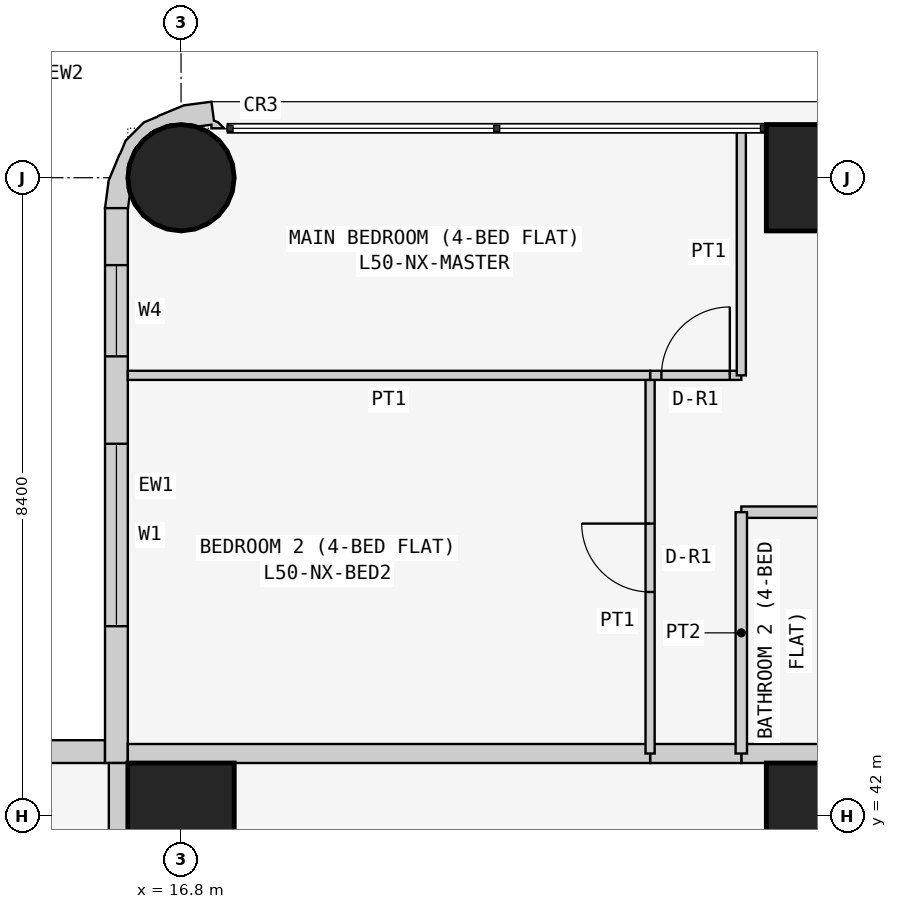
"""IFC4 building model, lengths in metres.
Left out: names, types, materials, properties, quantities, classifications, styles, units other than length and angle.
Written with IfcOpenShell. Run it as: python <this file> out.ifc"""

import sys

from ifc_helpers import new_model, si_unit, direction, frame, frame_2d, origin, origin_2d, place, context, subcontext, project, spatial, polyline, rectangle, circle, outline, extrude, element, fill, save


model = new_model("IFC4")
c1 = context("Model", 3, precision=1e-05, world=origin(), true_north=direction((0.0, 1.0)))
c2 = subcontext(c1, "Body", "Model", "MODEL_VIEW")
j1 = project(units=[si_unit("LENGTHUNIT", "METRE"), si_unit("PLANEANGLEUNIT", "RADIAN")], contexts=[c1])
p1 = place(None, origin())
s1 = spatial("IfcSite", under=j1, at=p1, CompositionType="ELEMENT")
p2 = place(p1, origin())
s2 = spatial("IfcBuilding", under=s1, at=p2, CompositionType="ELEMENT")
p3 = place(p2, frame((0.0, 0.0, 194.1)))
s3 = spatial("IfcBuildingStorey", under=s2, at=p3, CompositionType="ELEMENT", Elevation=194.1)
p4 = place(p3, frame((16.8, 42.0, 0.0), z_axis=(0.0, 0.0, 1.0), x_axis=(1.0, 0.0, 0.0)))
e1 = element("IfcColumn", 1, at=p4, inside=s3, PredefinedType="COLUMN", context=c2, shape_type="SweptSolid", body=[
    extrude(rectangle(XDim=1.4, YDim=1.4, at=origin_2d()), origin(), (0.0, 0.0, 1.0), 3.6),
])
p5 = place(p3, frame((16.8, 50.4, 0.0), z_axis=(0.0, 0.0, 1.0), x_axis=(1.0, 0.0, 0.0)))
e2 = element("IfcColumn", 2, at=p5, inside=s3, PredefinedType="COLUMN", context=c2, shape_type="SweptSolid", body=[
    extrude(circle(Radius=0.7, at=origin_2d()), origin(), (0.0, 0.0, 1.0), 3.6),
])
for number, where, z_axis, x_axis in (
    (3, (25.2, 42.0, 0.0), (0.0, 0.0, 1.0), (1.0, 0.0, 0.0)),
    (4, (25.2, 50.4, 0.0), (0.0, 0.0, 1.0), (1.0, 0.0, 0.0)),
):
    element("IfcColumn", number, at=place(p3, frame(where, z_axis=z_axis, x_axis=x_axis)), inside=s3, PredefinedType="COLUMN", context=c2, shape_type="SweptSolid", body=[
        extrude(rectangle(XDim=1.4, YDim=1.4, at=origin_2d()), origin(), (0.0, 0.0, 1.0), 3.6),
    ])
p6 = place(p3, frame((15.8, 42.85, 0.0), z_axis=(0.0, 0.0, 1.0), x_axis=(-1.0, 0.0, 0.0)))
e5 = element("IfcWall", 5, at=p6, inside=s3, PredefinedType="SOLIDWALL", context=c2, shape_type="SweptSolid", body=[
    extrude(rectangle(XDim=15.4, YDim=0.3, at=frame_2d((7.7, 0.0))), origin(), (0.0, 0.0, 1.0), 3.45),
])
p7 = place(p6, frame((1.2, 0.0, 0.9)))
e6 = element("IfcOpeningElement", 6, at=p7, cuts=e5, PredefinedType="OPENING", context=c2, shape_type="SweptSolid", body=[
    extrude(rectangle(XDim=1.8, YDim=1.5, at=frame_2d((0.9, 0.75))), frame((0.0, 0.16, 0.0), z_axis=(0.0, -1.0, 0.0), x_axis=(1.0, 0.0, 0.0)), (0.0, 0.0, 1.0), 0.32),
])
p8 = place(p6, frame((4.95, 0.0, 1.5)))
e7 = element("IfcOpeningElement", 7, at=p8, cuts=e5, PredefinedType="OPENING", context=c2, shape_type="SweptSolid", body=[
    extrude(rectangle(XDim=0.9, YDim=0.7, at=frame_2d((0.45, 0.35))), frame((0.0, 0.16, 0.0), z_axis=(0.0, -1.0, 0.0), x_axis=(1.0, 0.0, 0.0)), (0.0, 0.0, 1.0), 0.32),
])
p9 = place(p6, frame((8.5, 0.0, 0.9)))
e8 = element("IfcOpeningElement", 8, at=p9, cuts=e5, PredefinedType="OPENING", context=c2, shape_type="SweptSolid", body=[
    extrude(rectangle(XDim=1.8, YDim=1.5, at=frame_2d((0.9, 0.75))), frame((0.0, 0.16, 0.0), z_axis=(0.0, -1.0, 0.0), x_axis=(1.0, 0.0, 0.0)), (0.0, 0.0, 1.0), 0.32),
])
p10 = place(p6, frame((12.5, 0.0, 0.0)))
e9 = element("IfcOpeningElement", 9, at=p10, cuts=e5, PredefinedType="OPENING", context=c2, shape_type="SweptSolid", body=[
    extrude(rectangle(XDim=0.9, YDim=2.4, at=frame_2d((0.45, 1.2))), frame((0.0, 0.16, 0.0), z_axis=(0.0, -1.0, 0.0), x_axis=(1.0, 0.0, 0.0)), (0.0, 0.0, 1.0), 0.32),
])
p11 = place(p6, frame((13.5, 0.0, 0.9)))
e10 = element("IfcOpeningElement", 10, at=p11, cuts=e5, PredefinedType="OPENING", context=c2, shape_type="SweptSolid", body=[
    extrude(rectangle(XDim=1.2, YDim=1.5, at=frame_2d((0.6, 0.75))), frame((0.0, 0.16, 0.0), z_axis=(0.0, -1.0, 0.0), x_axis=(1.0, 0.0, 0.0)), (0.0, 0.0, 1.0), 0.32),
])
p12 = place(p3, frame((15.95, 50.0, 0.0), z_axis=(0.0, 0.0, 1.0), x_axis=(0.0, -1.0, 0.0)))
e11 = element("IfcWall", 11, at=p12, inside=s3, PredefinedType="SOLIDWALL", context=c2, shape_type="SweptSolid", body=[
    extrude(rectangle(XDim=7.3, YDim=0.3, at=frame_2d((3.65, 0.0))), origin(), (0.0, 0.0, 1.0), 3.45),
])
p13 = place(p12, frame((3.1, 0.0, 0.9)))
e12 = element("IfcOpeningElement", 12, at=p13, cuts=e11, PredefinedType="OPENING", context=c2, shape_type="SweptSolid", body=[
    extrude(rectangle(XDim=2.4, YDim=1.5, at=frame_2d((1.2, 0.75))), frame((0.0, 0.16, 0.0), z_axis=(0.0, -1.0, 0.0), x_axis=(1.0, 0.0, 0.0)), (0.0, 0.0, 1.0), 0.32),
])
p14 = place(p12, frame((0.75, 0.0, 0.9)))
e13 = element("IfcOpeningElement", 13, at=p14, cuts=e11, PredefinedType="OPENING", context=c2, shape_type="SweptSolid", body=[
    extrude(rectangle(XDim=1.2, YDim=1.5, at=frame_2d((0.6, 0.75))), frame((0.0, 0.16, 0.0), z_axis=(0.0, -1.0, 0.0), x_axis=(1.0, 0.0, 0.0)), (0.0, 0.0, 1.0), 0.32),
])
p15 = place(p3, frame((17.312, 50.988, 0.0), z_axis=(0.0, 0.0, 1.0), x_axis=(-0.439933741929, 0.898030234854, 0.0)))
e14 = element("IfcWall", 14, at=p15, inside=s3, PredefinedType="SOLIDWALL", context=c2, shape_type="SweptSolid", body=[
    extrude(outline(polyline([(0.138, -0.039), (0.182, -0.0), (0.419, -0.08), (0.536, 0.266), (0.559, 0.631), (0.555, 0.651), (0.566, 0.836), (0.456, 1.159), (0.333, 1.298), (0.324, 1.316), (0.082, 1.591), (-0.222, 1.793), (-0.39, 1.541), (-0.372, 1.532), (-0.195, 1.414), (-0.12, 1.41), (0.131, 1.287), (0.315, 1.078), (0.406, 0.814), (0.388, 0.536), (0.265, 0.285), (0.209, 0.236), (0.148, 0.053), (0.105, 0.074), (0.032, -0.076), (0.138, -0.039)])), origin(), (0.0, 0.0, 1.0), 3.45),
])
p16 = place(p3, frame((24.171, 42.825, 0.0), z_axis=(0.0, 0.0, 1.0), x_axis=(1.0, 0.0, 0.0)))
e15 = element("IfcWall", 15, at=p16, inside=s3, PredefinedType="PARTITIONING", context=c2, shape_type="SweptSolid", body=[
    extrude(rectangle(XDim=2.629, YDim=0.25, at=frame_2d((1.314, 0.0))), origin(), (0.0, 0.0, 1.0), 3.45),
])
p17 = place(p3, frame((22.971, 42.825, 0.0), z_axis=(0.0, 0.0, 1.0), x_axis=(1.0, 0.0, 0.0)))
e16 = element("IfcWall", 16, at=p17, inside=s3, PredefinedType="PARTITIONING", context=c2, shape_type="SweptSolid", body=[
    extrude(rectangle(XDim=1.2, YDim=0.25, at=frame_2d((0.6, 0.0))), origin(), (0.0, 0.0, 1.0), 3.45),
])
for number, where, z_axis, x_axis in (
    (17, (16.1, 42.825, 0.0), (0.0, 0.0, 1.0), (1.0, 0.0, 0.0)),
    (18, (15.975, 35.829, 0.0), (0.0, 0.0, 1.0), (0.0, 1.0, 0.0)),
):
    element("IfcWall", number, at=place(p3, frame(where, z_axis=z_axis, x_axis=x_axis)), inside=s3, PredefinedType="PARTITIONING", context=c2, shape_type="SweptSolid", body=[
        extrude(rectangle(XDim=6.871, YDim=0.25, at=frame_2d((3.436, 0.0))), origin(), (0.0, 0.0, 1.0), 3.45),
    ])
p18 = place(p3, frame((26.8, 46.0, 0.0), z_axis=(0.0, 0.0, 1.0), x_axis=(-1.0, 0.0, 0.0)))
e19 = element("IfcWall", 19, at=p18, inside=s3, PredefinedType="PARTITIONING", context=c2, shape_type="SweptSolid", body=[
    extrude(rectangle(XDim=2.629, YDim=0.15, at=frame_2d((1.314, 0.0))), origin(), (0.0, 0.0, 1.0), 3.45),
])
p19 = place(p3, frame((24.171, 46.0, 0.0), z_axis=(0.0, 0.0, 1.0), x_axis=(0.0, -1.0, 0.0)))
e20 = element("IfcWall", 20, at=p19, inside=s3, PredefinedType="PARTITIONING", context=c2, shape_type="SweptSolid", body=[
    extrude(rectangle(XDim=3.175, YDim=0.15, at=frame_2d((1.587, 0.0))), origin(), (0.0, 0.0, 1.0), 3.45),
])
p20 = place(p3, frame((22.971, 42.825, 0.0), z_axis=(0.0, 0.0, 1.0), x_axis=(0.0, 1.0, 0.0)))
e21 = element("IfcWall", 21, at=p20, inside=s3, PredefinedType="PARTITIONING", context=c2, shape_type="SweptSolid", body=[
    extrude(rectangle(XDim=4.975, YDim=0.12, at=frame_2d((2.488, 0.0))), origin(), (0.0, 0.0, 1.0), 3.45),
])
p21 = place(p20, frame((2.125, 0.0, 0.0)))
e22 = element("IfcOpeningElement", 22, at=p21, cuts=e21, PredefinedType="OPENING", context=c2, shape_type="SweptSolid", body=[
    extrude(rectangle(XDim=0.9, YDim=2.1, at=frame_2d((0.45, 1.05))), frame((0.0, 0.07, 0.0), z_axis=(0.0, -1.0, 0.0), x_axis=(1.0, 0.0, 0.0)), (0.0, 0.0, 1.0), 0.14),
])
p22 = place(p3, frame((22.971, 47.8, 0.0), z_axis=(0.0, 0.0, 1.0), x_axis=(1.0, 0.0, 0.0)))
e23 = element("IfcWall", 23, at=p22, inside=s3, PredefinedType="PARTITIONING", context=c2, shape_type="SweptSolid", body=[
    extrude(rectangle(XDim=1.2, YDim=0.12, at=frame_2d((0.6, 0.0))), origin(), (0.0, 0.0, 1.0), 3.45),
])
p23 = place(p22, frame((0.149, 0.0, 0.0)))
e24 = element("IfcOpeningElement", 24, at=p23, cuts=e23, PredefinedType="OPENING", context=c2, shape_type="SweptSolid", body=[
    extrude(rectangle(XDim=0.9, YDim=2.1, at=frame_2d((0.45, 1.05))), frame((0.0, 0.07, 0.0), z_axis=(0.0, -1.0, 0.0), x_axis=(1.0, 0.0, 0.0)), (0.0, 0.0, 1.0), 0.14),
])
p24 = place(p3, frame((24.171, 47.8, 0.0), z_axis=(0.0, 0.0, 1.0), x_axis=(0.0, 1.0, 0.0)))
e25 = element("IfcWall", 25, at=p24, inside=s3, PredefinedType="PARTITIONING", context=c2, shape_type="SweptSolid", body=[
    extrude(rectangle(XDim=3.25, YDim=0.12, at=frame_2d((1.625, 0.0))), origin(), (0.0, 0.0, 1.0), 3.45),
])
p25 = place(p3, frame((22.971, 47.8, 0.0), z_axis=(0.0, 0.0, 1.0), x_axis=(-1.0, 0.0, 0.0)))
e26 = element("IfcWall", 26, at=p25, inside=s3, PredefinedType="PARTITIONING", context=c2, shape_type="SweptSolid", body=[
    extrude(rectangle(XDim=6.871, YDim=0.12, at=frame_2d((3.436, 0.0))), origin(), (0.0, 0.0, 1.0), 3.45),
])
p26 = place(p13, origin())
e27 = element("IfcWindow", 27, at=p26, inside=s3, PartitioningType="SINGLE_PANEL", PredefinedType="WINDOW", context=c2, shape_type="SweptSolid", body=[
    extrude(rectangle(XDim=2.4, YDim=1.5, at=frame_2d((1.2, 0.75))), frame((0.0, 0.03, 0.0), z_axis=(0.0, -1.0, 0.0), x_axis=(1.0, 0.0, 0.0)), (0.0, 0.0, 1.0), 0.06),
])
fill(e12, e27)
p27 = place(p14, origin())
e28 = element("IfcWindow", 28, at=p27, inside=s3, PartitioningType="SINGLE_PANEL", PredefinedType="WINDOW", context=c2, shape_type="SweptSolid", body=[
    extrude(rectangle(XDim=1.2, YDim=1.5, at=frame_2d((0.6, 0.75))), frame((0.0, 0.03, 0.0), z_axis=(0.0, -1.0, 0.0), x_axis=(1.0, 0.0, 0.0)), (0.0, 0.0, 1.0), 0.06),
])
fill(e13, e28)
p28 = place(p21, origin())
e29 = element("IfcDoor", 29, at=p28, inside=s3, OperationType="SINGLE_SWING_RIGHT", PredefinedType="DOOR", context=c2, shape_type="SweptSolid", body=[
    extrude(rectangle(XDim=0.9, YDim=2.1, at=frame_2d((0.45, 1.05))), frame((0.0, 0.025, 0.0), z_axis=(0.0, -1.0, 0.0), x_axis=(1.0, 0.0, 0.0)), (0.0, 0.0, 1.0), 0.05),
])
fill(e22, e29)
p29 = place(p23, origin())
e30 = element("IfcDoor", 30, at=p29, inside=s3, OperationType="SINGLE_SWING_RIGHT", PredefinedType="DOOR", context=c2, shape_type="SweptSolid", body=[
    extrude(rectangle(XDim=0.9, YDim=2.1, at=frame_2d((0.45, 1.05))), frame((0.0, 0.025, 0.0), z_axis=(0.0, -1.0, 0.0), x_axis=(1.0, 0.0, 0.0)), (0.0, 0.0, 1.0), 0.05),
])
fill(e24, e30)
save(model, sys.argv[1])
